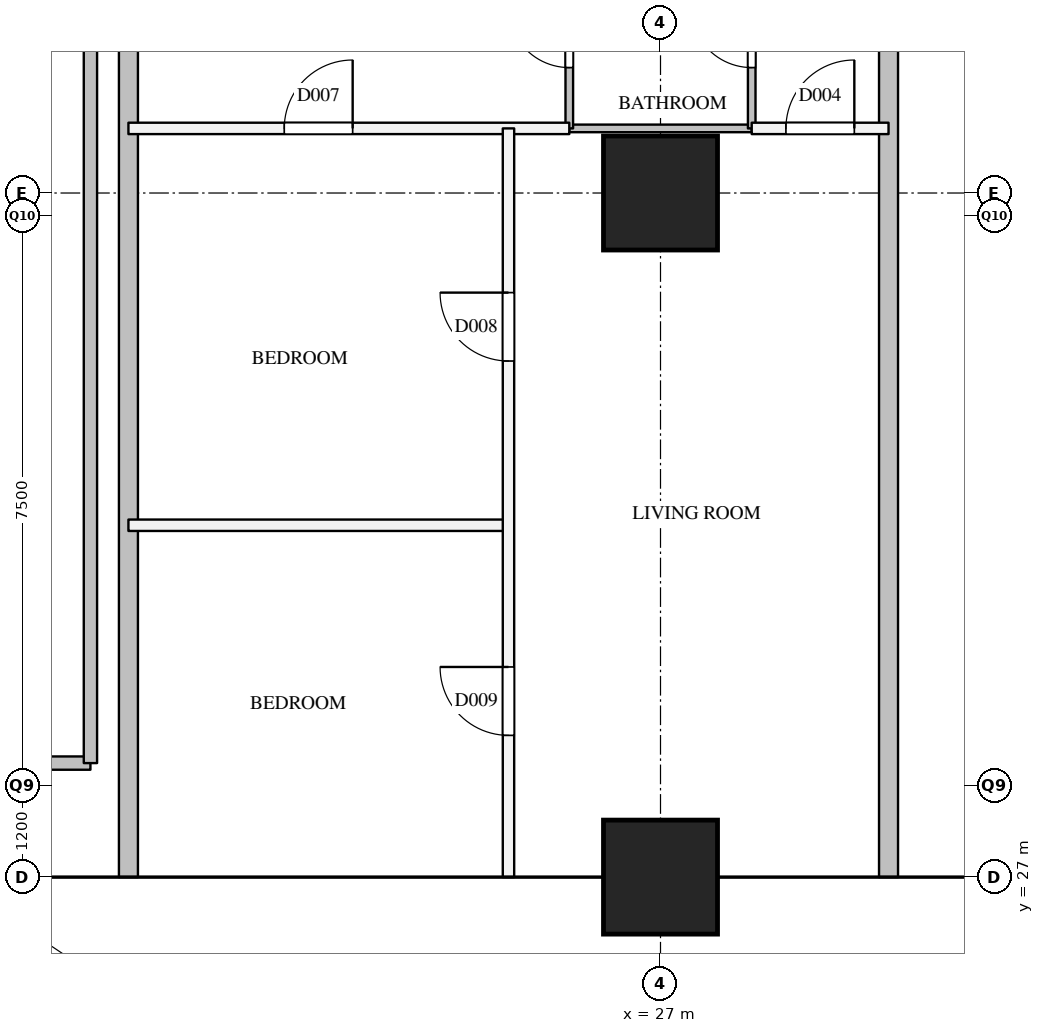
"""IFC4 building model, lengths in metres.
Left out: names, types, materials, properties, quantities, classifications, styles, units other than length and angle.
Written with IfcOpenShell. Run it as: python <this file> out.ifc"""

import sys

from ifc_helpers import new_model, si_unit, direction, frame, frame_2d, origin, origin_2d, place, context, subcontext, project, spatial, rectangle, extrude, element, fill, save


model = new_model("IFC4")
c1 = context("Model", 3, precision=1e-05, world=origin(), true_north=direction((0.0, 1.0)))
c2 = subcontext(c1, "Body", "Model", "MODEL_VIEW")
j1 = project(units=[si_unit("LENGTHUNIT", "METRE"), si_unit("PLANEANGLEUNIT", "RADIAN")], contexts=[c1])
p1 = place(None, origin())
s1 = spatial("IfcSite", under=j1, at=p1, CompositionType="ELEMENT")
p2 = place(p1, origin())
s2 = spatial("IfcBuilding", under=s1, at=p2, CompositionType="ELEMENT")
p3 = place(p2, frame((0.0, 0.0, 134.9)))
s3 = spatial("IfcBuildingStorey", under=s2, at=p3, CompositionType="ELEMENT", Elevation=134.9)
for number, where, z_axis, x_axis in (
    (1, (27.0, 27.0, 0.0), (0.0, 0.0, 1.0), (1.0, 0.0, 0.0)),
    (2, (27.0, 36.0, 0.0), (0.0, 0.0, 1.0), (1.0, 0.0, 0.0)),
):
    element("IfcColumn", number, at=place(p3, frame(where, z_axis=z_axis, x_axis=x_axis)), inside=s3, PredefinedType="COLUMN", context=c2, shape_type="SweptSolid", body=[
        extrude(rectangle(XDim=1.5, YDim=1.5, at=origin_2d()), origin(), (0.0, 0.0, 1.0), 3.9),
    ])
p4 = place(p3, frame((18.0, 28.5, 0.0), z_axis=(0.0, 0.0, 1.0), x_axis=(1.0, 0.0, 0.0)))
e3 = element("IfcWall", 3, at=p4, inside=s3, PredefinedType="PARTITIONING", context=c2, shape_type="SweptSolid", body=[
    extrude(rectangle(XDim=1.5, YDim=0.175, at=frame_2d((0.75, 0.0))), origin(), (0.0, 0.0, 1.0), 3.6),
])
p5 = place(p3, frame((19.5, 28.5, 0.0), z_axis=(0.0, 0.0, 1.0), x_axis=(0.0, 1.0, 0.0)))
e4 = element("IfcWall", 4, at=p5, inside=s3, PredefinedType="PARTITIONING", context=c2, shape_type="SweptSolid", body=[
    extrude(rectangle(XDim=10.75, YDim=0.175, at=frame_2d((5.375, 0.0))), origin(), (0.0, 0.0, 1.0), 3.6),
])
p6 = place(p3, frame((20.0, 31.629, 0.0), z_axis=(0.0, 0.0, 1.0), x_axis=(1.0, 0.0, 0.0)))
e5 = element("IfcWall", 5, at=p6, inside=s3, PredefinedType="PARTITIONING", context=c2, shape_type="SweptSolid", body=[
    extrude(rectangle(XDim=5.0, YDim=0.15, at=frame_2d((2.5, 0.0))), origin(), (0.0, 0.0, 1.0), 3.6),
])
p7 = place(p3, frame((20.0, 36.85, 0.0), z_axis=(0.0, 0.0, 1.0), x_axis=(1.0, 0.0, 0.0)))
e6 = element("IfcWall", 6, at=p7, inside=s3, PredefinedType="PARTITIONING", context=c2, shape_type="SweptSolid", body=[
    extrude(rectangle(XDim=5.8, YDim=0.15, at=frame_2d((2.9, 0.0))), origin(), (0.0, 0.0, 1.0), 3.6),
])
p8 = place(p7, frame((2.05, 0.0, 0.0)))
e7 = element("IfcOpeningElement", 7, at=p8, cuts=e6, PredefinedType="OPENING", context=c2, shape_type="SweptSolid", body=[
    extrude(rectangle(XDim=0.9, YDim=2.1, at=frame_2d((0.45, 1.05))), frame((0.0, 0.085, 0.0), z_axis=(0.0, -1.0, 0.0), x_axis=(1.0, 0.0, 0.0)), (0.0, 0.0, 1.0), 0.17),
])
p9 = place(p3, frame((28.2, 36.85, 0.0), z_axis=(0.0, 0.0, 1.0), x_axis=(1.0, 0.0, 0.0)))
e8 = element("IfcWall", 8, at=p9, inside=s3, PredefinedType="PARTITIONING", context=c2, shape_type="SweptSolid", body=[
    extrude(rectangle(XDim=1.8, YDim=0.15, at=frame_2d((0.9, 0.0))), origin(), (0.0, 0.0, 1.0), 3.6),
])
p10 = place(p9, frame((0.45, 0.0, 0.0)))
e9 = element("IfcOpeningElement", 9, at=p10, cuts=e8, PredefinedType="OPENING", context=c2, shape_type="SweptSolid", body=[
    extrude(rectangle(XDim=0.9, YDim=2.1, at=frame_2d((0.45, 1.05))), frame((0.0, 0.085, 0.0), z_axis=(0.0, -1.0, 0.0), x_axis=(1.0, 0.0, 0.0)), (0.0, 0.0, 1.0), 0.17),
])
p11 = place(p3, frame((25.0, 27.0, 0.0), z_axis=(0.0, 0.0, 1.0), x_axis=(0.0, 1.0, 0.0)))
e10 = element("IfcWall", 10, at=p11, inside=s3, PredefinedType="PARTITIONING", context=c2, shape_type="SweptSolid", body=[
    extrude(rectangle(XDim=9.85, YDim=0.15, at=frame_2d((4.925, 0.0))), origin(), (0.0, 0.0, 1.0), 2.6),
])
p12 = place(p11, frame((6.79, 0.0, 0.0)))
e11 = element("IfcOpeningElement", 11, at=p12, cuts=e10, PredefinedType="OPENING", context=c2, shape_type="SweptSolid", body=[
    extrude(rectangle(XDim=0.9, YDim=2.1, at=frame_2d((0.45, 1.05))), frame((0.0, 0.085, 0.0), z_axis=(0.0, -1.0, 0.0), x_axis=(1.0, 0.0, 0.0)), (0.0, 0.0, 1.0), 0.17),
])
p13 = place(p11, frame((1.865, 0.0, 0.0)))
e12 = element("IfcOpeningElement", 12, at=p13, cuts=e10, PredefinedType="OPENING", context=c2, shape_type="SweptSolid", body=[
    extrude(rectangle(XDim=0.9, YDim=2.1, at=frame_2d((0.45, 1.05))), frame((0.0, 0.085, 0.0), z_axis=(0.0, -1.0, 0.0), x_axis=(1.0, 0.0, 0.0)), (0.0, 0.0, 1.0), 0.17),
])
for number, where, z_axis, x_axis in (
    (13, (20.0, 27.0, 0.0), (0.0, 0.0, 1.0), (0.0, 1.0, 0.0)),
    (14, (30.0, 27.0, 0.0), (0.0, 0.0, 1.0), (0.0, 1.0, 0.0)),
):
    element("IfcWall", number, at=place(p3, frame(where, z_axis=z_axis, x_axis=x_axis)), inside=s3, PredefinedType="PARTITIONING", context=c2, shape_type="SweptSolid", body=[
        extrude(rectangle(XDim=12.25, YDim=0.25, at=frame_2d((6.125, 0.0))), origin(), (0.0, 0.0, 1.0), 2.6),
    ])
p14 = place(p3, frame((25.8, 36.85, 0.0), z_axis=(0.0, 0.0, 1.0), x_axis=(1.0, 0.0, 0.0)))
e15 = element("IfcWall", 15, at=p14, inside=s3, PredefinedType="PARTITIONING", context=c2, shape_type="SweptSolid", body=[
    extrude(rectangle(XDim=2.4, YDim=0.1, at=frame_2d((1.2, 0.0))), origin(), (0.0, 0.0, 1.0), 2.6),
])
p15 = place(p3, frame((25.8, 36.85, 0.0), z_axis=(0.0, 0.0, 1.0), x_axis=(0.0, 1.0, 0.0)))
e16 = element("IfcWall", 16, at=p15, inside=s3, PredefinedType="PARTITIONING", context=c2, shape_type="SweptSolid", body=[
    extrude(rectangle(XDim=2.4, YDim=0.1, at=frame_2d((1.2, 0.0))), origin(), (0.0, 0.0, 1.0), 3.6),
])
p16 = place(p15, frame((0.8, 0.0, 0.0)))
e17 = element("IfcOpeningElement", 17, at=p16, cuts=e16, PredefinedType="OPENING", context=c2, shape_type="SweptSolid", body=[
    extrude(rectangle(XDim=0.8, YDim=2.1, at=frame_2d((0.4, 1.05))), frame((0.0, 0.06, 0.0), z_axis=(0.0, -1.0, 0.0), x_axis=(1.0, 0.0, 0.0)), (0.0, 0.0, 1.0), 0.12),
])
p17 = place(p3, frame((28.2, 36.85, 0.0), z_axis=(0.0, 0.0, 1.0), x_axis=(0.0, 1.0, 0.0)))
e18 = element("IfcWall", 18, at=p17, inside=s3, PredefinedType="PARTITIONING", context=c2, shape_type="SweptSolid", body=[
    extrude(rectangle(XDim=2.4, YDim=0.1, at=frame_2d((1.2, 0.0))), origin(), (0.0, 0.0, 1.0), 3.6),
])
p18 = place(p17, frame((0.8, 0.0, 0.0)))
e19 = element("IfcOpeningElement", 19, at=p18, cuts=e18, PredefinedType="OPENING", context=c2, shape_type="SweptSolid", body=[
    extrude(rectangle(XDim=0.8, YDim=2.1, at=frame_2d((0.4, 1.05))), frame((0.0, 0.06, 0.0), z_axis=(0.0, -1.0, 0.0), x_axis=(1.0, 0.0, 0.0)), (0.0, 0.0, 1.0), 0.12),
])
p19 = place(p10, origin())
e20 = element("IfcDoor", 20, at=p19, inside=s3, OperationType="SINGLE_SWING_RIGHT", PredefinedType="DOOR", context=c2, shape_type="SweptSolid", body=[
    extrude(rectangle(XDim=0.9, YDim=2.1, at=frame_2d((0.45, 1.05))), frame((0.0, 0.025, 0.0), z_axis=(0.0, -1.0, 0.0), x_axis=(1.0, 0.0, 0.0)), (0.0, 0.0, 1.0), 0.05),
])
fill(e9, e20)
p20 = place(p18, origin())
e21 = element("IfcDoor", 21, at=p20, inside=s3, OperationType="SINGLE_SWING_RIGHT", PredefinedType="DOOR", context=c2, shape_type="SweptSolid", body=[
    extrude(rectangle(XDim=0.8, YDim=2.1, at=frame_2d((0.4, 1.05))), frame((0.0, 0.025, 0.0), z_axis=(0.0, -1.0, 0.0), x_axis=(1.0, 0.0, 0.0)), (0.0, 0.0, 1.0), 0.05),
])
fill(e19, e21)
p21 = place(p16, origin())
e22 = element("IfcDoor", 22, at=p21, inside=s3, OperationType="SINGLE_SWING_RIGHT", PredefinedType="DOOR", context=c2, shape_type="SweptSolid", body=[
    extrude(rectangle(XDim=0.8, YDim=2.1, at=frame_2d((0.4, 1.05))), frame((0.0, 0.025, 0.0), z_axis=(0.0, -1.0, 0.0), x_axis=(1.0, 0.0, 0.0)), (0.0, 0.0, 1.0), 0.05),
])
fill(e17, e22)
p22 = place(p8, origin())
e23 = element("IfcDoor", 23, at=p22, inside=s3, OperationType="SINGLE_SWING_RIGHT", PredefinedType="DOOR", context=c2, shape_type="SweptSolid", body=[
    extrude(rectangle(XDim=0.9, YDim=2.1, at=frame_2d((0.45, 1.05))), frame((0.0, 0.025, 0.0), z_axis=(0.0, -1.0, 0.0), x_axis=(1.0, 0.0, 0.0)), (0.0, 0.0, 1.0), 0.05),
])
fill(e7, e23)
p23 = place(p12, origin())
e24 = element("IfcDoor", 24, at=p23, inside=s3, OperationType="SINGLE_SWING_RIGHT", PredefinedType="DOOR", context=c2, shape_type="SweptSolid", body=[
    extrude(rectangle(XDim=0.9, YDim=2.1, at=frame_2d((0.45, 1.05))), frame((0.0, 0.025, 0.0), z_axis=(0.0, -1.0, 0.0), x_axis=(1.0, 0.0, 0.0)), (0.0, 0.0, 1.0), 0.05),
])
fill(e11, e24)
p24 = place(p13, origin())
e25 = element("IfcDoor", 25, at=p24, inside=s3, OperationType="SINGLE_SWING_RIGHT", PredefinedType="DOOR", context=c2, shape_type="SweptSolid", body=[
    extrude(rectangle(XDim=0.9, YDim=2.1, at=frame_2d((0.45, 1.05))), frame((0.0, 0.025, 0.0), z_axis=(0.0, -1.0, 0.0), x_axis=(1.0, 0.0, 0.0)), (0.0, 0.0, 1.0), 0.05),
])
fill(e12, e25)
save(model, sys.argv[1])
